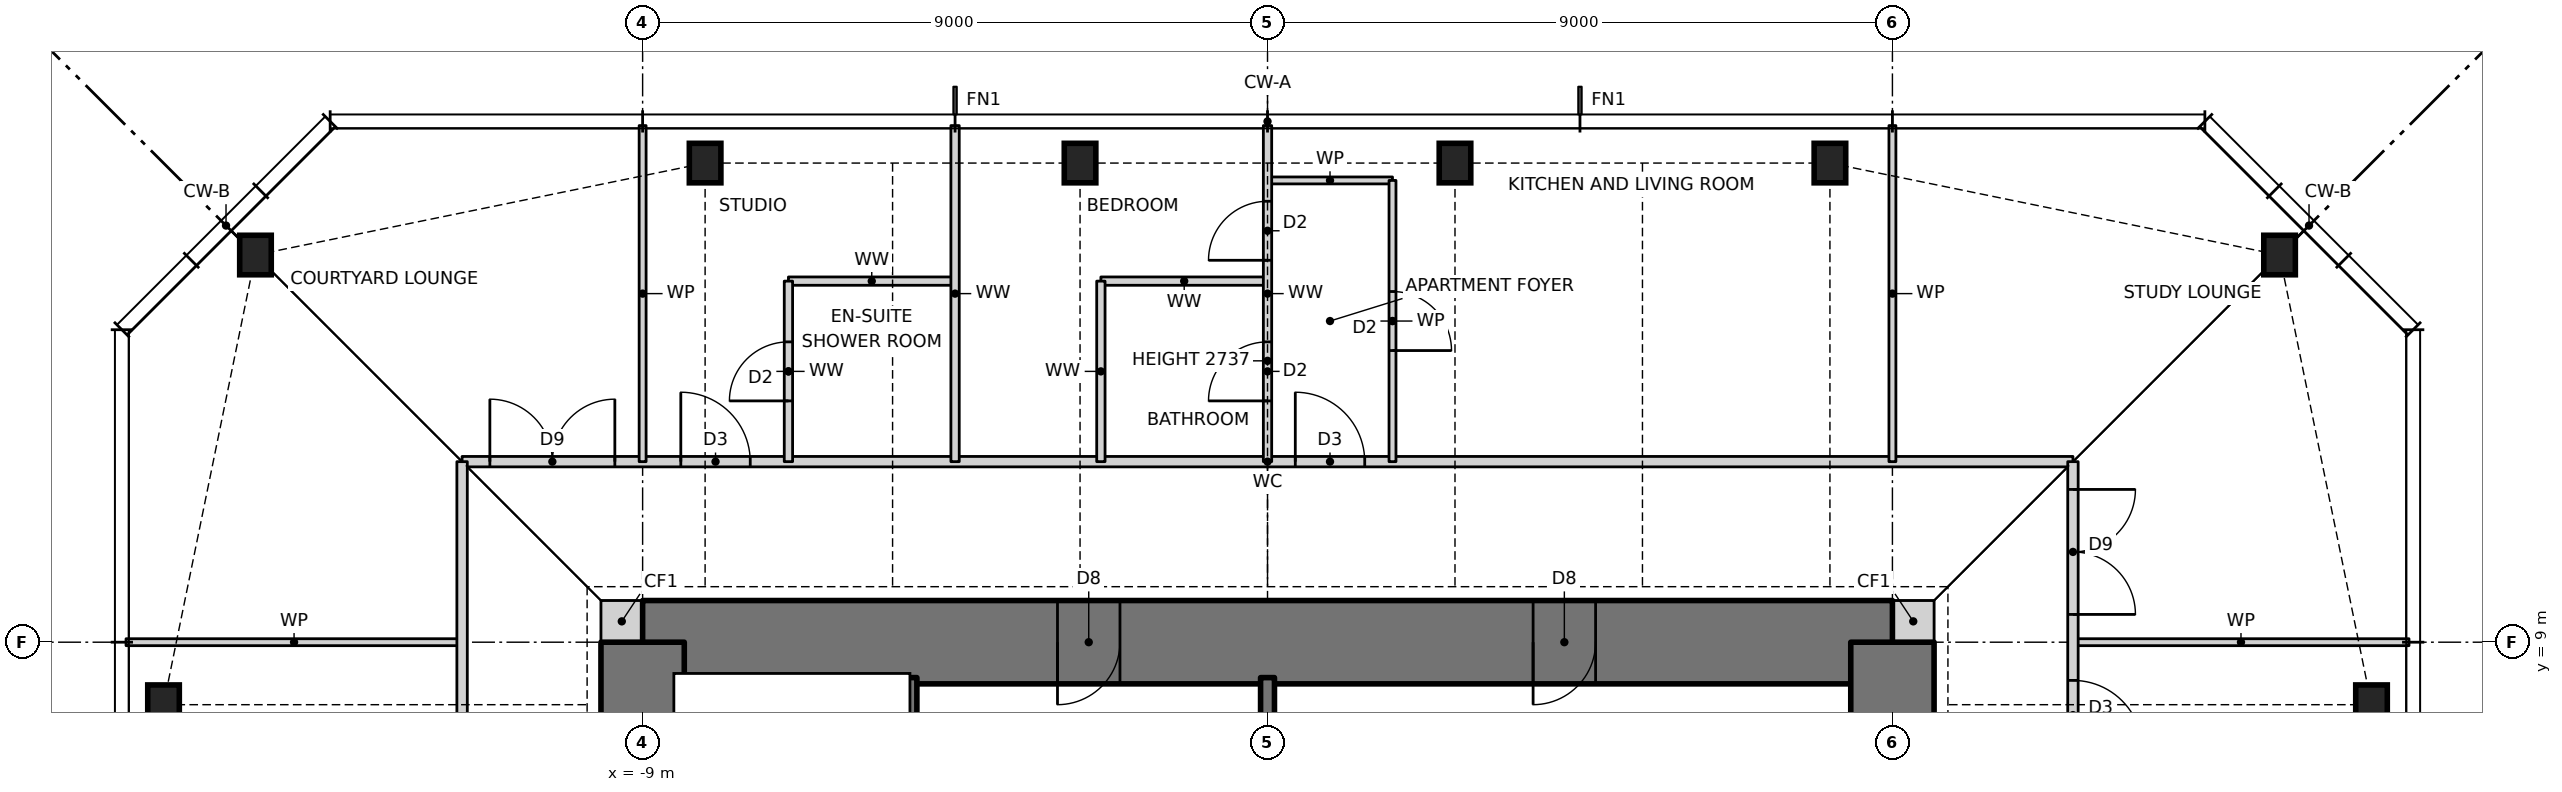
"""IFC4 building model, lengths in metres.
Left out: names, types, materials, properties, quantities, classifications, styles, units other than length and angle.
Written with IfcOpenShell. Run it as: python <this file> out.ifc"""

import sys

from ifc_helpers import new_model, si_unit, direction, frame, frame_2d, origin, origin_2d, place, context, subcontext, project, spatial, rectangle, i_section, extrude, element, fill, save


model = new_model("IFC4")
c1 = context("Model", 3, precision=1e-05, world=origin(), true_north=direction((0.0, 1.0)))
c2 = subcontext(c1, "Body", "Model", "MODEL_VIEW")
j1 = project(units=[si_unit("LENGTHUNIT", "METRE"), si_unit("PLANEANGLEUNIT", "RADIAN")], contexts=[c1])
p1 = place(None, origin())
s1 = spatial("IfcSite", under=j1, at=p1, CompositionType="ELEMENT")
p2 = place(p1, origin())
s2 = spatial("IfcBuilding", under=s1, at=p2, CompositionType="ELEMENT")
p3 = place(p2, frame((0.0, 0.0, 236.0)))
s3 = spatial("IfcBuildingStorey", under=s2, at=p3, CompositionType="ELEMENT", Elevation=236.0)
for number, where, z_axis, x_axis in (
    (1, (15.9, 8.1, 0.0), (0.0, 0.0, 1.0), (1.0, 0.0, 0.0)),
    (2, (14.576, 14.576, 0.0), (0.0, 0.0, 1.0), (1.0, 0.0, 0.0)),
    (3, (8.1, 15.9, 0.0), (0.0, 0.0, 1.0), (1.0, 0.0, 0.0)),
    (4, (2.7, 15.9, 0.0), (0.0, 0.0, 1.0), (1.0, 0.0, 0.0)),
    (5, (-2.7, 15.9, 0.0), (0.0, 0.0, 1.0), (1.0, 0.0, 0.0)),
    (6, (-8.1, 15.9, 0.0), (0.0, 0.0, 1.0), (1.0, 0.0, 0.0)),
    (7, (-14.576, 14.576, 0.0), (0.0, 0.0, 1.0), (1.0, 0.0, 0.0)),
    (8, (-15.9, 8.1, 0.0), (0.0, 0.0, 1.0), (1.0, 0.0, 0.0)),
):
    element("IfcColumn", number, at=place(p3, frame(where, z_axis=z_axis, x_axis=x_axis)), inside=s3, PredefinedType="COLUMN", context=c2, shape_type="SweptSolid", body=[
        extrude(i_section(OverallWidth=0.455, OverallDepth=0.569, WebThickness=0.078, FlangeThickness=0.125, at=origin_2d()), origin(), (0.0, 0.0, 1.0), 3.5),
    ])
for number, where, z_axis, x_axis in (
    (9, (9.0, 9.3, 0.0), (0.0, 0.0, 1.0), (1.0, 0.0, 0.0)),
    (10, (-9.6, 9.3, 0.0), (0.0, 0.0, 1.0), (1.0, 0.0, 0.0)),
):
    element("IfcWall", number, at=place(p3, frame(where, z_axis=z_axis, x_axis=x_axis)), inside=s3, PredefinedType="SOLIDWALL", context=c2, shape_type="SweptSolid", body=[
        extrude(rectangle(XDim=0.6, YDim=0.6, at=frame_2d((0.3, 0.0))), origin(), (0.0, 0.0, 1.0), 3.5),
    ])
p4 = place(p3, frame((9.0, 9.0, 0.0), z_axis=(0.0, 0.0, 1.0), x_axis=(-1.0, 0.0, 0.0)))
e11 = element("IfcWall", 11, at=p4, inside=s3, PredefinedType="SHEAR", context=c2, shape_type="SweptSolid", body=[
    extrude(rectangle(XDim=18.0, YDim=1.2, at=frame_2d((9.0, 0.0))), origin(), (0.0, 0.0, 1.0), 3.5),
])
p5 = place(p4, frame((11.125, 0.0, 0.0)))
e12 = element("IfcOpeningElement", 12, at=p5, cuts=e11, PredefinedType="OPENING", context=c2, shape_type="SweptSolid", body=[
    extrude(rectangle(XDim=0.9, YDim=2.1, at=frame_2d((0.45, 1.05))), frame((0.0, 0.61, 0.0), z_axis=(0.0, -1.0, 0.0), x_axis=(1.0, 0.0, 0.0)), (0.0, 0.0, 1.0), 1.22),
])
p6 = place(p4, frame((4.275, 0.0, 0.0)))
e13 = element("IfcOpeningElement", 13, at=p6, cuts=e11, PredefinedType="OPENING", context=c2, shape_type="SweptSolid", body=[
    extrude(rectangle(XDim=0.9, YDim=2.1, at=frame_2d((0.45, 1.05))), frame((0.0, 0.61, 0.0), z_axis=(0.0, -1.0, 0.0), x_axis=(1.0, 0.0, 0.0)), (0.0, 0.0, 1.0), 1.22),
])
p7 = place(p3, frame((9.0, -9.0, 0.0), z_axis=(0.0, 0.0, 1.0), x_axis=(0.0, 1.0, 0.0)))
e14 = element("IfcWall", 14, at=p7, inside=s3, PredefinedType="SHEAR", context=c2, shape_type="SweptSolid", body=[
    extrude(rectangle(XDim=18.0, YDim=1.2, at=frame_2d((9.0, 0.0))), origin(), (0.0, 0.0, 1.0), 3.5),
])
p8 = place(p7, frame((8.5, 0.0, 0.0)))
e15 = element("IfcOpeningElement", 15, at=p8, cuts=e14, PredefinedType="OPENING", context=c2, shape_type="SweptSolid", body=[
    extrude(rectangle(XDim=1.0, YDim=2.1, at=frame_2d((0.5, 1.05))), frame((0.0, 0.61, 0.0), z_axis=(0.0, -1.0, 0.0), x_axis=(1.0, 0.0, 0.0)), (0.0, 0.0, 1.0), 1.22),
])
p9 = place(p3, frame((-9.0, 9.0, 0.0), z_axis=(0.0, 0.0, 1.0), x_axis=(0.0, -1.0, 0.0)))
e16 = element("IfcWall", 16, at=p9, inside=s3, PredefinedType="SHEAR", context=c2, shape_type="SweptSolid", body=[
    extrude(rectangle(XDim=18.0, YDim=1.2, at=frame_2d((9.0, 0.0))), origin(), (0.0, 0.0, 1.0), 3.5),
])
p10 = place(p9, frame((8.5, 0.0, 0.0)))
e17 = element("IfcOpeningElement", 17, at=p10, cuts=e16, PredefinedType="OPENING", context=c2, shape_type="SweptSolid", body=[
    extrude(rectangle(XDim=1.0, YDim=2.1, at=frame_2d((0.5, 1.05))), frame((0.0, 0.61, 0.0), z_axis=(0.0, -1.0, 0.0), x_axis=(1.0, 0.0, 0.0)), (0.0, 0.0, 1.0), 1.22),
])
for number, where, z_axis, x_axis in (
    (18, (-16.44, 9.0, 0.0), (0.0, 0.0, 1.0), (1.0, 0.0, 0.0)),
    (19, (11.6, 9.0, 0.0), (0.0, 0.0, 1.0), (1.0, 0.0, 0.0)),
):
    element("IfcWall", number, at=place(p3, frame(where, z_axis=z_axis, x_axis=x_axis)), inside=s3, PredefinedType="PARTITIONING", context=c2, shape_type="SweptSolid", body=[
        extrude(rectangle(XDim=4.84, YDim=0.1, at=frame_2d((2.42, 0.0))), origin(), (0.0, 0.0, 1.0), 3.27),
    ])
p11 = place(p3, frame((-11.6, 11.6, 0.0), z_axis=(0.0, 0.0, 1.0), x_axis=(1.0, 0.0, 0.0)))
e20 = element("IfcWall", 20, at=p11, inside=s3, PredefinedType="PARTITIONING", context=c2, shape_type="SweptSolid", body=[
    extrude(rectangle(XDim=23.2, YDim=0.15, at=frame_2d((11.6, 0.0))), origin(), (0.0, 0.0, 1.0), 3.27),
])
p12 = place(p11, frame((12.0, 0.0, 0.0)))
e21 = element("IfcOpeningElement", 21, at=p12, cuts=e20, PredefinedType="OPENING", context=c2, shape_type="SweptSolid", body=[
    extrude(rectangle(XDim=1.0, YDim=2.1, at=frame_2d((0.5, 1.05))), frame((0.0, 0.085, 0.0), z_axis=(0.0, -1.0, 0.0), x_axis=(1.0, 0.0, 0.0)), (0.0, 0.0, 1.0), 0.17),
])
p13 = place(p11, frame((3.15, 0.0, 0.0)))
e22 = element("IfcOpeningElement", 22, at=p13, cuts=e20, PredefinedType="OPENING", context=c2, shape_type="SweptSolid", body=[
    extrude(rectangle(XDim=1.0, YDim=2.1, at=frame_2d((0.5, 1.05))), frame((0.0, 0.085, 0.0), z_axis=(0.0, -1.0, 0.0), x_axis=(1.0, 0.0, 0.0)), (0.0, 0.0, 1.0), 0.17),
])
p14 = place(p11, frame((0.4, 0.0, 0.0)))
e23 = element("IfcOpeningElement", 23, at=p14, cuts=e20, PredefinedType="OPENING", context=c2, shape_type="SweptSolid", body=[
    extrude(rectangle(XDim=1.8, YDim=2.1, at=frame_2d((0.9, 1.05))), frame((0.0, 0.085, 0.0), z_axis=(0.0, -1.0, 0.0), x_axis=(1.0, 0.0, 0.0)), (0.0, 0.0, 1.0), 0.17),
])
for number, where, z_axis, x_axis in (
    (24, (-6.9, 14.2, 0.0), (0.0, 0.0, 1.0), (1.0, 0.0, 0.0)),
    (25, (-2.4, 14.2, 0.0), (0.0, 0.0, 1.0), (1.0, 0.0, 0.0)),
):
    element("IfcWall", number, at=place(p3, frame(where, z_axis=z_axis, x_axis=x_axis)), inside=s3, PredefinedType="PARTITIONING", context=c2, shape_type="SweptSolid", body=[
        extrude(rectangle(XDim=2.4, YDim=0.12, at=frame_2d((1.2, 0.0))), origin(), (0.0, 0.0, 1.0), 3.27),
    ])
p15 = place(p3, frame((0.0, 15.65, 0.0), z_axis=(0.0, 0.0, 1.0), x_axis=(1.0, 0.0, 0.0)))
e26 = element("IfcWall", 26, at=p15, inside=s3, PredefinedType="PARTITIONING", context=c2, shape_type="SweptSolid", body=[
    extrude(rectangle(XDim=1.8, YDim=0.1, at=frame_2d((0.9, 0.0))), origin(), (0.0, 0.0, 1.0), 3.27),
])
p16 = place(p3, frame((11.6, -12.1, 0.0), z_axis=(0.0, 0.0, 1.0), x_axis=(0.0, 1.0, 0.0)))
e27 = element("IfcWall", 27, at=p16, inside=s3, PredefinedType="PARTITIONING", context=c2, shape_type="SweptSolid", body=[
    extrude(rectangle(XDim=23.7, YDim=0.15, at=frame_2d((11.85, 0.0))), origin(), (0.0, 0.0, 1.0), 3.27),
])
p17 = place(p16, frame((10.7, 0.0, 0.0)))
e28 = element("IfcOpeningElement", 28, at=p17, cuts=e27, PredefinedType="OPENING", context=c2, shape_type="SweptSolid", body=[
    extrude(rectangle(XDim=1.0, YDim=2.1, at=frame_2d((0.5, 1.05))), frame((0.0, 0.085, 0.0), z_axis=(0.0, -1.0, 0.0), x_axis=(1.0, 0.0, 0.0)), (0.0, 0.0, 1.0), 0.17),
])
p18 = place(p16, frame((19.55, 0.0, 0.0)))
e29 = element("IfcOpeningElement", 29, at=p18, cuts=e27, PredefinedType="OPENING", context=c2, shape_type="SweptSolid", body=[
    extrude(rectangle(XDim=1.0, YDim=2.1, at=frame_2d((0.5, 1.05))), frame((0.0, 0.085, 0.0), z_axis=(0.0, -1.0, 0.0), x_axis=(1.0, 0.0, 0.0)), (0.0, 0.0, 1.0), 0.17),
])
p19 = place(p16, frame((21.5, 0.0, 0.0)))
e30 = element("IfcOpeningElement", 30, at=p19, cuts=e27, PredefinedType="OPENING", context=c2, shape_type="SweptSolid", body=[
    extrude(rectangle(XDim=1.8, YDim=2.1, at=frame_2d((0.9, 1.05))), frame((0.0, 0.085, 0.0), z_axis=(0.0, -1.0, 0.0), x_axis=(1.0, 0.0, 0.0)), (0.0, 0.0, 1.0), 0.17),
])
p20 = place(p16, frame((0.65, 0.0, 0.0)))
e31 = element("IfcOpeningElement", 31, at=p20, cuts=e27, PredefinedType="OPENING", context=c2, shape_type="SweptSolid", body=[
    extrude(rectangle(XDim=1.8, YDim=2.1, at=frame_2d((0.9, 1.05))), frame((0.0, 0.085, 0.0), z_axis=(0.0, -1.0, 0.0), x_axis=(1.0, 0.0, 0.0)), (0.0, 0.0, 1.0), 0.17),
])
p21 = place(p3, frame((9.0, 11.6, 0.0), z_axis=(0.0, 0.0, 1.0), x_axis=(0.0, 1.0, 0.0)))
e32 = element("IfcWall", 32, at=p21, inside=s3, PredefinedType="PARTITIONING", context=c2, shape_type="SweptSolid", body=[
    extrude(rectangle(XDim=4.84, YDim=0.1, at=frame_2d((2.42, 0.0))), origin(), (0.0, 0.0, 1.0), 3.27),
])
p22 = place(p3, frame((1.8, 11.6, 0.0), z_axis=(0.0, 0.0, 1.0), x_axis=(0.0, 1.0, 0.0)))
e33 = element("IfcWall", 33, at=p22, inside=s3, PredefinedType="PARTITIONING", context=c2, shape_type="SweptSolid", body=[
    extrude(rectangle(XDim=4.05, YDim=0.1, at=frame_2d((2.025, 0.0))), origin(), (0.0, 0.0, 1.0), 3.27),
])
p23 = place(p22, frame((1.6, 0.0, 0.0)))
e34 = element("IfcOpeningElement", 34, at=p23, cuts=e33, PredefinedType="OPENING", context=c2, shape_type="SweptSolid", body=[
    extrude(rectangle(XDim=0.85, YDim=2.1, at=frame_2d((0.425, 1.05))), frame((0.0, 0.06, 0.0), z_axis=(0.0, -1.0, 0.0), x_axis=(1.0, 0.0, 0.0)), (0.0, 0.0, 1.0), 0.12),
])
p24 = place(p3, frame((0.0, 4.4, 0.0), z_axis=(0.0, 0.0, 1.0), x_axis=(0.0, 1.0, 0.0)))
e35 = element("IfcWall", 35, at=p24, inside=s3, PredefinedType="SOLIDWALL", context=c2, shape_type="SweptSolid", body=[
    extrude(rectangle(XDim=4.09, YDim=0.2, at=frame_2d((2.045, 0.0))), origin(), (0.0, 0.0, 1.0), 3.5),
])
p25 = place(p3, frame((0.0, 11.6, 0.0), z_axis=(0.0, 0.0, 1.0), x_axis=(0.0, 1.0, 0.0)))
e36 = element("IfcWall", 36, at=p25, inside=s3, PredefinedType="PARTITIONING", context=c2, shape_type="SweptSolid", body=[
    extrude(rectangle(XDim=4.84, YDim=0.12, at=frame_2d((2.42, 0.0))), origin(), (0.0, 0.0, 1.0), 2.737),
])
p26 = place(p25, frame((2.9, 0.0, 0.0)))
e37 = element("IfcOpeningElement", 37, at=p26, cuts=e36, PredefinedType="OPENING", context=c2, shape_type="SweptSolid", body=[
    extrude(rectangle(XDim=0.85, YDim=2.1, at=frame_2d((0.425, 1.05))), frame((0.0, 0.07, 0.0), z_axis=(0.0, -1.0, 0.0), x_axis=(1.0, 0.0, 0.0)), (0.0, 0.0, 1.0), 0.14),
])
p27 = place(p25, frame((0.875, 0.0, 0.0)))
e38 = element("IfcOpeningElement", 38, at=p27, cuts=e36, PredefinedType="OPENING", context=c2, shape_type="SweptSolid", body=[
    extrude(rectangle(XDim=0.85, YDim=2.1, at=frame_2d((0.425, 1.05))), frame((0.0, 0.07, 0.0), z_axis=(0.0, -1.0, 0.0), x_axis=(1.0, 0.0, 0.0)), (0.0, 0.0, 1.0), 0.14),
])
p28 = place(p3, frame((-2.4, 11.6, 0.0), z_axis=(0.0, 0.0, 1.0), x_axis=(0.0, 1.0, 0.0)))
e39 = element("IfcWall", 39, at=p28, inside=s3, PredefinedType="PARTITIONING", context=c2, shape_type="SweptSolid", body=[
    extrude(rectangle(XDim=2.6, YDim=0.12, at=frame_2d((1.3, 0.0))), origin(), (0.0, 0.0, 1.0), 3.27),
])
p29 = place(p3, frame((-4.5, 11.6, 0.0), z_axis=(0.0, 0.0, 1.0), x_axis=(0.0, 1.0, 0.0)))
e40 = element("IfcWall", 40, at=p29, inside=s3, PredefinedType="PARTITIONING", context=c2, shape_type="SweptSolid", body=[
    extrude(rectangle(XDim=4.84, YDim=0.12, at=frame_2d((2.42, 0.0))), origin(), (0.0, 0.0, 1.0), 3.27),
])
p30 = place(p3, frame((-5.15, 1.6, 0.0), z_axis=(0.0, 0.0, 1.0), x_axis=(0.0, 1.0, 0.0)))
e41 = element("IfcWall", 41, at=p30, inside=s3, PredefinedType="SOLIDWALL", context=c2, shape_type="SweptSolid", body=[
    extrude(rectangle(XDim=6.89, YDim=0.2, at=frame_2d((3.445, 0.0))), origin(), (0.0, 0.0, 1.0), 3.5),
])
p31 = place(p3, frame((-6.9, 11.6, 0.0), z_axis=(0.0, 0.0, 1.0), x_axis=(0.0, 1.0, 0.0)))
e42 = element("IfcWall", 42, at=p31, inside=s3, PredefinedType="PARTITIONING", context=c2, shape_type="SweptSolid", body=[
    extrude(rectangle(XDim=2.6, YDim=0.12, at=frame_2d((1.3, 0.0))), origin(), (0.0, 0.0, 1.0), 3.27),
])
p32 = place(p31, frame((0.875, 0.0, 0.0)))
e43 = element("IfcOpeningElement", 43, at=p32, cuts=e42, PredefinedType="OPENING", context=c2, shape_type="SweptSolid", body=[
    extrude(rectangle(XDim=0.85, YDim=2.1, at=frame_2d((0.425, 1.05))), frame((0.0, 0.07, 0.0), z_axis=(0.0, -1.0, 0.0), x_axis=(1.0, 0.0, 0.0)), (0.0, 0.0, 1.0), 0.14),
])
p33 = place(p3, frame((-9.0, 11.6, 0.0), z_axis=(0.0, 0.0, 1.0), x_axis=(0.0, 1.0, 0.0)))
e44 = element("IfcWall", 44, at=p33, inside=s3, PredefinedType="PARTITIONING", context=c2, shape_type="SweptSolid", body=[
    extrude(rectangle(XDim=4.84, YDim=0.1, at=frame_2d((2.42, 0.0))), origin(), (0.0, 0.0, 1.0), 3.27),
])
p34 = place(p3, frame((-11.6, -12.1, 0.0), z_axis=(0.0, 0.0, 1.0), x_axis=(0.0, 1.0, 0.0)))
e45 = element("IfcWall", 45, at=p34, inside=s3, PredefinedType="PARTITIONING", context=c2, shape_type="SweptSolid", body=[
    extrude(rectangle(XDim=23.7, YDim=0.15, at=frame_2d((11.85, 0.0))), origin(), (0.0, 0.0, 1.0), 3.27),
])
p35 = place(p34, frame((12.5, 0.0, 0.0)))
e46 = element("IfcOpeningElement", 46, at=p35, cuts=e45, PredefinedType="OPENING", context=c2, shape_type="SweptSolid", body=[
    extrude(rectangle(XDim=1.0, YDim=2.1, at=frame_2d((0.5, 1.05))), frame((0.0, 0.085, 0.0), z_axis=(0.0, -1.0, 0.0), x_axis=(1.0, 0.0, 0.0)), (0.0, 0.0, 1.0), 0.17),
])
p36 = place(p34, frame((3.65, 0.0, 0.0)))
e47 = element("IfcOpeningElement", 47, at=p36, cuts=e45, PredefinedType="OPENING", context=c2, shape_type="SweptSolid", body=[
    extrude(rectangle(XDim=1.0, YDim=2.1, at=frame_2d((0.5, 1.05))), frame((0.0, 0.085, 0.0), z_axis=(0.0, -1.0, 0.0), x_axis=(1.0, 0.0, 0.0)), (0.0, 0.0, 1.0), 0.17),
])
p37 = place(p34, frame((1.125, 0.0, 0.0)))
e48 = element("IfcOpeningElement", 48, at=p37, cuts=e45, PredefinedType="OPENING", context=c2, shape_type="SweptSolid", body=[
    extrude(rectangle(XDim=0.85, YDim=2.1, at=frame_2d((0.425, 1.05))), frame((0.0, 0.085, 0.0), z_axis=(0.0, -1.0, 0.0), x_axis=(1.0, 0.0, 0.0)), (0.0, 0.0, 1.0), 0.17),
])
p38 = place(p18, frame((1.0, 0.0, 0.0), z_axis=(0.0, 0.0, 1.0), x_axis=(-1.0, 0.0, 0.0)))
e49 = element("IfcDoor", 49, at=p38, inside=s3, OperationType="SINGLE_SWING_RIGHT", PredefinedType="DOOR", context=c2, shape_type="SweptSolid", body=[
    extrude(rectangle(XDim=1.0, YDim=2.1, at=frame_2d((0.5, 1.05))), frame((0.0, 0.025, 0.0), z_axis=(0.0, -1.0, 0.0), x_axis=(1.0, 0.0, 0.0)), (0.0, 0.0, 1.0), 0.05),
])
fill(e29, e49)
p39 = place(p12, origin())
e50 = element("IfcDoor", 50, at=p39, inside=s3, OperationType="SINGLE_SWING_LEFT", PredefinedType="DOOR", context=c2, shape_type="SweptSolid", body=[
    extrude(rectangle(XDim=1.0, YDim=2.1, at=frame_2d((0.5, 1.05))), frame((0.0, 0.025, 0.0), z_axis=(0.0, -1.0, 0.0), x_axis=(1.0, 0.0, 0.0)), (0.0, 0.0, 1.0), 0.05),
])
fill(e21, e50)
p40 = place(p23, frame((0.85, 0.0, 0.0), z_axis=(0.0, 0.0, 1.0), x_axis=(-1.0, 0.0, 0.0)))
e51 = element("IfcDoor", 51, at=p40, inside=s3, OperationType="SINGLE_SWING_RIGHT", PredefinedType="DOOR", context=c2, shape_type="SweptSolid", body=[
    extrude(rectangle(XDim=0.85, YDim=2.1, at=frame_2d((0.425, 1.05))), frame((0.0, 0.025, 0.0), z_axis=(0.0, -1.0, 0.0), x_axis=(1.0, 0.0, 0.0)), (0.0, 0.0, 1.0), 0.05),
])
fill(e34, e51)
p41 = place(p26, origin())
e52 = element("IfcDoor", 52, at=p41, inside=s3, OperationType="SINGLE_SWING_LEFT", PredefinedType="DOOR", context=c2, shape_type="SweptSolid", body=[
    extrude(rectangle(XDim=0.85, YDim=2.1, at=frame_2d((0.425, 1.05))), frame((0.0, 0.025, 0.0), z_axis=(0.0, -1.0, 0.0), x_axis=(1.0, 0.0, 0.0)), (0.0, 0.0, 1.0), 0.05),
])
fill(e37, e52)
p42 = place(p27, origin())
e53 = element("IfcDoor", 53, at=p42, inside=s3, OperationType="SINGLE_SWING_LEFT", PredefinedType="DOOR", context=c2, shape_type="SweptSolid", body=[
    extrude(rectangle(XDim=0.85, YDim=2.1, at=frame_2d((0.425, 1.05))), frame((0.0, 0.025, 0.0), z_axis=(0.0, -1.0, 0.0), x_axis=(1.0, 0.0, 0.0)), (0.0, 0.0, 1.0), 0.05),
])
fill(e38, e53)
p43 = place(p13, origin())
e54 = element("IfcDoor", 54, at=p43, inside=s3, OperationType="SINGLE_SWING_LEFT", PredefinedType="DOOR", context=c2, shape_type="SweptSolid", body=[
    extrude(rectangle(XDim=1.0, YDim=2.1, at=frame_2d((0.5, 1.05))), frame((0.0, 0.025, 0.0), z_axis=(0.0, -1.0, 0.0), x_axis=(1.0, 0.0, 0.0)), (0.0, 0.0, 1.0), 0.05),
])
fill(e22, e54)
p44 = place(p32, origin())
e55 = element("IfcDoor", 55, at=p44, inside=s3, OperationType="SINGLE_SWING_LEFT", PredefinedType="DOOR", context=c2, shape_type="SweptSolid", body=[
    extrude(rectangle(XDim=0.85, YDim=2.1, at=frame_2d((0.425, 1.05))), frame((0.0, 0.025, 0.0), z_axis=(0.0, -1.0, 0.0), x_axis=(1.0, 0.0, 0.0)), (0.0, 0.0, 1.0), 0.05),
])
fill(e43, e55)
p45 = place(p19, frame((1.8, 0.0, 0.0), z_axis=(0.0, 0.0, 1.0), x_axis=(-1.0, 0.0, 0.0)))
e56 = element("IfcDoor", 56, at=p45, inside=s3, OperationType="DOUBLE_DOOR_SINGLE_SWING", PredefinedType="DOOR", context=c2, shape_type="SweptSolid", body=[
    extrude(rectangle(XDim=1.8, YDim=2.1, at=frame_2d((0.9, 1.05))), frame((0.0, 0.025, 0.0), z_axis=(0.0, -1.0, 0.0), x_axis=(1.0, 0.0, 0.0)), (0.0, 0.0, 1.0), 0.05),
])
fill(e30, e56)
p46 = place(p14, origin())
e57 = element("IfcDoor", 57, at=p46, inside=s3, OperationType="DOUBLE_DOOR_SINGLE_SWING", PredefinedType="DOOR", context=c2, shape_type="SweptSolid", body=[
    extrude(rectangle(XDim=1.8, YDim=2.1, at=frame_2d((0.9, 1.05))), frame((0.0, 0.025, 0.0), z_axis=(0.0, -1.0, 0.0), x_axis=(1.0, 0.0, 0.0)), (0.0, 0.0, 1.0), 0.05),
])
fill(e23, e57)
p47 = place(p5, origin())
e58 = element("IfcDoor", 58, at=p47, inside=s3, OperationType="SINGLE_SWING_RIGHT", PredefinedType="DOOR", context=c2, shape_type="SweptSolid", body=[
    extrude(rectangle(XDim=0.9, YDim=2.1, at=frame_2d((0.45, 1.05))), frame((0.0, 0.025, 0.0), z_axis=(0.0, -1.0, 0.0), x_axis=(1.0, 0.0, 0.0)), (0.0, 0.0, 1.0), 0.05),
])
fill(e12, e58)
p48 = place(p6, origin())
e59 = element("IfcDoor", 59, at=p48, inside=s3, OperationType="SINGLE_SWING_RIGHT", PredefinedType="DOOR", context=c2, shape_type="SweptSolid", body=[
    extrude(rectangle(XDim=0.9, YDim=2.1, at=frame_2d((0.45, 1.05))), frame((0.0, 0.025, 0.0), z_axis=(0.0, -1.0, 0.0), x_axis=(1.0, 0.0, 0.0)), (0.0, 0.0, 1.0), 0.05),
])
fill(e13, e59)
save(model, sys.argv[1])
